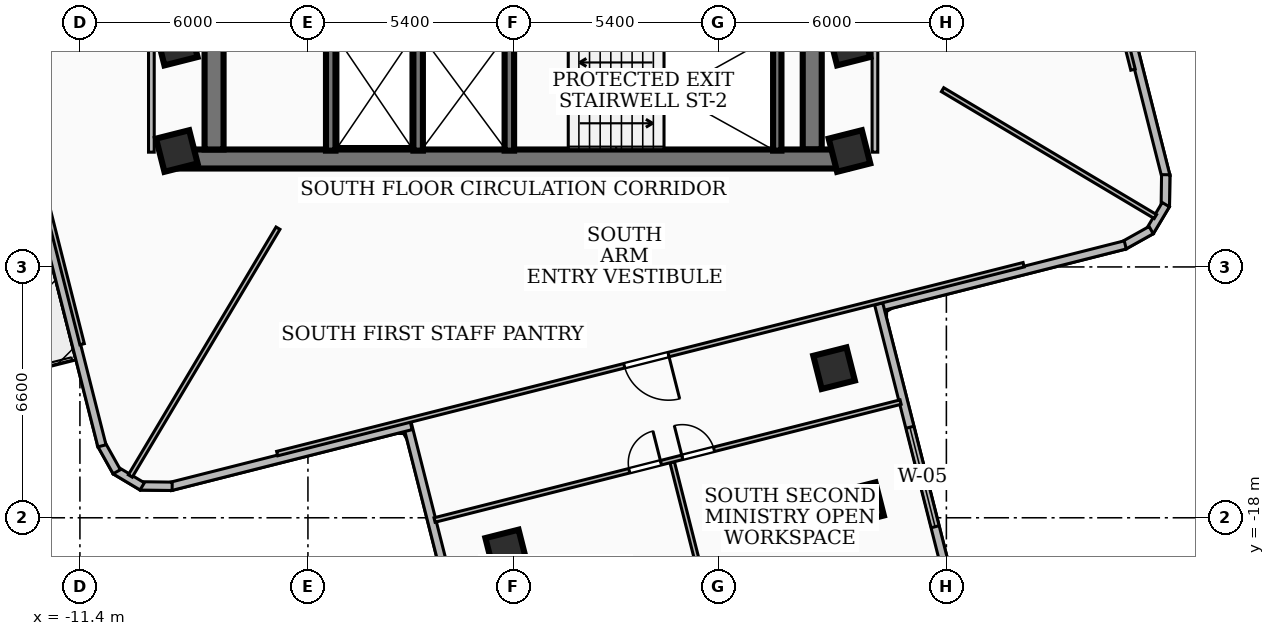
"""IFC4 building model, lengths in metres.
Left out: names, types, materials, properties, quantities, classifications, styles, units other than length and angle.
Written with IfcOpenShell. Run it as: python <this file> out.ifc"""

import sys

from ifc_helpers import new_model, si_unit, direction, frame, frame_2d, origin, origin_2d, place, context, subcontext, project, spatial, rectangle, extrude, element, fill, save


model = new_model("IFC4")
c1 = context("Model", 3, precision=1e-05, world=origin(), true_north=direction((0.0, 1.0)))
c2 = subcontext(c1, "Body", "Model", "MODEL_VIEW")
j1 = project(units=[si_unit("LENGTHUNIT", "METRE"), si_unit("PLANEANGLEUNIT", "RADIAN")], contexts=[c1])
p1 = place(None, origin())
s1 = spatial("IfcSite", under=j1, at=p1, CompositionType="ELEMENT")
p2 = place(p1, origin())
s2 = spatial("IfcBuilding", under=s1, at=p2, CompositionType="ELEMENT")
p3 = place(p2, frame((0.0, 0.0, 127.08)))
s3 = spatial("IfcBuildingStorey", under=s2, at=p3, CompositionType="ELEMENT", Elevation=127.08)
p4 = place(p3, frame((8.78, -8.56, 0.0), z_axis=(0.0, 0.0, 1.0), x_axis=(-1.0, 0.0, 0.0)))
e1 = element("IfcWall", 1, at=p4, inside=s3, PredefinedType="SHEAR", context=c2, shape_type="SweptSolid", body=[
    extrude(rectangle(XDim=17.56, YDim=0.5, at=frame_2d((8.78, 0.0))), origin(), (0.0, 0.0, 1.0), 3.34),
])
for number, where, z_axis, x_axis in (
    (2, (-7.87, -8.31, 0.0), (0.0, 0.0, 1.0), (0.0, 1.0, 0.0)),
    (3, (7.87, -2.0, 0.0), (0.0, 0.0, 1.0), (0.0, -1.0, 0.0)),
):
    element("IfcWall", number, at=place(p3, frame(where, z_axis=z_axis, x_axis=x_axis)), inside=s3, PredefinedType="SHEAR", context=c2, shape_type="SweptSolid", body=[
        extrude(rectangle(XDim=6.31, YDim=0.5, at=frame_2d((3.155, 0.0))), origin(), (0.0, 0.0, 1.0), 3.34),
    ])
p5 = place(p3, frame((6.95, -8.34, 0.0), z_axis=(0.0, 0.0, 1.0), x_axis=(0.0, 1.0, 0.0)))
e4 = element("IfcWall", 4, at=p5, inside=s3, PredefinedType="SOLIDWALL", context=c2, shape_type="SweptSolid", body=[
    extrude(rectangle(XDim=3.06, YDim=0.22, at=frame_2d((1.53, 0.0))), origin(), (0.0, 0.0, 1.0), 3.34),
])
for number, where, z_axis, x_axis in (
    (5, (-0.1, -8.34, 0.0), (0.0, 0.0, 1.0), (0.0, 1.0, 0.0)),
    (6, (-2.5, -8.34, 0.0), (0.0, 0.0, 1.0), (0.0, 1.0, 0.0)),
    (7, (-4.8, -8.34, 0.0), (0.0, 0.0, 1.0), (0.0, 1.0, 0.0)),
):
    element("IfcWall", number, at=place(p3, frame(where, z_axis=z_axis, x_axis=x_axis)), inside=s3, PredefinedType="SOLIDWALL", context=c2, shape_type="SweptSolid", body=[
        extrude(rectangle(XDim=3.04, YDim=0.25, at=frame_2d((1.52, 0.0))), origin(), (0.0, 0.0, 1.0), 3.34),
    ])
for number, where, z_axis, x_axis in (
    (8, (-8.85, -5.55, 0.0), (0.0, 0.0, 1.0), (0.969, 0.245, 0.0)),
    (9, (8.85, -5.55, 0.0), (0.0, 0.0, 1.0), (0.969, 0.245, 0.0)),
    (10, (8.85, -8.35, 0.0), (0.0, 0.0, 1.0), (0.969, 0.245, 0.0)),
    (11, (-8.85, -8.35, 0.0), (0.0, 0.0, 1.0), (0.969, 0.245, 0.0)),
    (12, (-0.183, -18.86, 0.0), (0.0, 0.0, 1.0), (0.969, 0.245, 0.0)),
    (13, (8.445, -14.064, 0.0), (0.0, 0.0, 1.0), (0.969, 0.245, 0.0)),
    (14, (9.208, -17.615, 0.0), (0.0, 0.0, 1.0), (0.969, 0.245, 0.0)),
):
    element("IfcColumn", number, at=place(p3, frame(where, z_axis=z_axis, x_axis=x_axis)), inside=s3, PredefinedType="COLUMN", context=c2, shape_type="SweptSolid", body=[
        extrude(rectangle(XDim=0.9, YDim=0.9, at=origin_2d()), origin(), (0.0, 0.0, 1.0), 3.6),
    ])
p6 = place(p3, frame((15.574, -2.684, 0.0), z_axis=(0.0, 0.0, 1.0), x_axis=(0.245346347134, -0.969435490349, 0.0)))
e15 = element("IfcWall", 15, at=p6, inside=s3, PredefinedType="SOLIDWALL", context=c2, shape_type="SweptSolid", body=[
    extrude(rectangle(XDim=6.538, YDim=0.22, at=frame_2d((3.269, 0.0))), origin(), (0.0, 0.0, 1.0), 3.34),
])
p7 = place(p3, frame((17.172, -8.973, 0.0), z_axis=(0.0, 0.0, 1.0), x_axis=(-0.013464821393, -0.999909345183, 0.0)))
e16 = element("IfcWall", 16, at=p7, inside=s3, PredefinedType="SOLIDWALL", context=c2, shape_type="SweptSolid", body=[
    extrude(rectangle(XDim=0.834, YDim=0.22, at=frame_2d((0.417, 0.0))), origin(), (0.0, 0.0, 1.0), 3.34),
])
p8 = place(p3, frame((17.174, -9.761, 0.0), z_axis=(0.0, 0.0, 1.0), x_axis=(-0.512960801038, -0.858412031951, 0.0)))
e17 = element("IfcWall", 17, at=p8, inside=s3, PredefinedType="SOLIDWALL", context=c2, shape_type="SweptSolid", body=[
    extrude(rectangle(XDim=0.819, YDim=0.22, at=frame_2d((0.41, 0.0))), origin(), (0.0, 0.0, 1.0), 3.34),
])
p9 = place(p3, frame((16.789, -10.431, 0.0), z_axis=(0.0, 0.0, 1.0), x_axis=(-0.872870149311, -0.487952561671, 0.0)))
e18 = element("IfcWall", 18, at=p9, inside=s3, PredefinedType="SOLIDWALL", context=c2, shape_type="SweptSolid", body=[
    extrude(rectangle(XDim=0.834, YDim=0.22, at=frame_2d((0.417, 0.0))), origin(), (0.0, 0.0, 1.0), 3.34),
])
p10 = place(p3, frame((16.107, -10.82, 0.0), z_axis=(0.0, 0.0, 1.0), x_axis=(-0.969443674581, -0.245314006561, 0.0)))
e19 = element("IfcWall", 19, at=p10, inside=s3, PredefinedType="SOLIDWALL", context=c2, shape_type="SweptSolid", body=[
    extrude(rectangle(XDim=6.759, YDim=0.22, at=frame_2d((3.379, 0.0))), origin(), (0.0, 0.0, 1.0), 3.34),
])
p11 = place(p3, frame((9.618, -12.371, 0.0), z_axis=(0.0, 0.0, 1.0), x_axis=(0.245401293719, -0.969421582719, 0.0)))
e20 = element("IfcWall", 20, at=p11, inside=s3, PredefinedType="SOLIDWALL", context=c2, shape_type="SweptSolid", body=[
    extrude(rectangle(XDim=9.458, YDim=0.22, at=frame_2d((4.729, 0.0))), origin(), (0.0, 0.0, 1.0), 3.34),
])
p12 = place(p11, frame((3.35, 0.0, 0.85)))
e21 = element("IfcOpeningElement", 21, at=p12, cuts=e20, PredefinedType="OPENING", context=c2, shape_type="SweptSolid", body=[
    extrude(rectangle(XDim=2.7, YDim=1.85, at=frame_2d((1.35, 0.925))), frame((0.0, 0.12, 0.0), z_axis=(0.0, -1.0, 0.0), x_axis=(1.0, 0.0, 0.0)), (0.0, 0.0, 1.0), 0.24),
])
p13 = place(p3, frame((-0.47, -24.68, 0.0), z_axis=(0.0, 0.0, 1.0), x_axis=(-0.245401293719, 0.969421582719, 0.0)))
e22 = element("IfcWall", 22, at=p13, inside=s3, PredefinedType="SOLIDWALL", context=c2, shape_type="SweptSolid", body=[
    extrude(rectangle(XDim=9.458, YDim=0.22, at=frame_2d((4.729, 0.0))), origin(), (0.0, 0.0, 1.0), 2.57),
])
p14 = place(p3, frame((-2.684, -15.574, 0.0), z_axis=(0.0, 0.0, 1.0), x_axis=(-0.969435490349, -0.245346347134, 0.0)))
e23 = element("IfcWall", 23, at=p14, inside=s3, PredefinedType="SOLIDWALL", context=c2, shape_type="SweptSolid", body=[
    extrude(rectangle(XDim=6.538, YDim=0.22, at=frame_2d((3.269, 0.0))), origin(), (0.0, 0.0, 1.0), 2.57),
])
p15 = place(p3, frame((-8.973, -17.172, 0.0), z_axis=(0.0, 0.0, 1.0), x_axis=(-0.999909345183, 0.013464821393, 0.0)))
e24 = element("IfcWall", 24, at=p15, inside=s3, PredefinedType="SOLIDWALL", context=c2, shape_type="SweptSolid", body=[
    extrude(rectangle(XDim=0.834, YDim=0.22, at=frame_2d((0.417, 0.0))), origin(), (0.0, 0.0, 1.0), 3.34),
])
p16 = place(p3, frame((-9.761, -17.174, 0.0), z_axis=(0.0, 0.0, 1.0), x_axis=(-0.858412031951, 0.512960801038, 0.0)))
e25 = element("IfcWall", 25, at=p16, inside=s3, PredefinedType="SOLIDWALL", context=c2, shape_type="SweptSolid", body=[
    extrude(rectangle(XDim=0.819, YDim=0.22, at=frame_2d((0.41, 0.0))), origin(), (0.0, 0.0, 1.0), 3.34),
])
p17 = place(p3, frame((-10.431, -16.789, 0.0), z_axis=(0.0, 0.0, 1.0), x_axis=(-0.487952561671, 0.872870149311, 0.0)))
e26 = element("IfcWall", 26, at=p17, inside=s3, PredefinedType="SOLIDWALL", context=c2, shape_type="SweptSolid", body=[
    extrude(rectangle(XDim=0.834, YDim=0.22, at=frame_2d((0.417, 0.0))), origin(), (0.0, 0.0, 1.0), 3.34),
])
p18 = place(p3, frame((-10.82, -16.107, 0.0), z_axis=(0.0, 0.0, 1.0), x_axis=(-0.245314006561, 0.969443674581, 0.0)))
e27 = element("IfcWall", 27, at=p18, inside=s3, PredefinedType="SOLIDWALL", context=c2, shape_type="SweptSolid", body=[
    extrude(rectangle(XDim=6.759, YDim=0.22, at=frame_2d((3.379, 0.0))), origin(), (0.0, 0.0, 1.0), 2.644),
])
for number, where, z_axis, x_axis in (
    (28, (-9.52, -8.38, 0.0), (0.0, 0.0, 1.0), (0.0, 1.0, 0.0)),
    (29, (9.52, -8.38, 0.0), (0.0, 0.0, 1.0), (0.0, 1.0, 0.0)),
):
    element("IfcWall", number, at=place(p3, frame(where, z_axis=z_axis, x_axis=x_axis)), inside=s3, PredefinedType="PARTITIONING", context=c2, shape_type="SweptSolid", body=[
        extrude(rectangle(XDim=6.63, YDim=0.15, at=frame_2d((3.315, 0.0))), origin(), (0.0, 0.0, 1.0), 2.57),
    ])
p19 = place(p3, frame((-6.188, -10.38, 0.0), z_axis=(0.0, 0.0, 1.0), x_axis=(-0.511972353143, -0.859001926434, 0.0)))
e30 = element("IfcWall", 30, at=p19, inside=s3, PredefinedType="PARTITIONING", context=c2, shape_type="SweptSolid", body=[
    extrude(rectangle(XDim=7.59, YDim=0.12, at=frame_2d((3.795, 0.0))), origin(), (0.0, 0.0, 1.0), 2.57),
])
p20 = place(p3, frame((11.3, -6.736, 0.0), z_axis=(0.0, 0.0, 1.0), x_axis=(0.858979599017, -0.512009812868, 0.0)))
e31 = element("IfcWall", 31, at=p20, inside=s3, PredefinedType="PARTITIONING", context=c2, shape_type="SweptSolid", body=[
    extrude(rectangle(XDim=6.519, YDim=0.12, at=frame_2d((3.26, 0.0))), origin(), (0.0, 0.0, 1.0), 3.34),
])
p21 = place(p3, frame((11.342, 13.433, 0.0), z_axis=(0.0, 0.0, 1.0), x_axis=(0.24525085526, -0.969459652587, 0.0)))
e32 = element("IfcWall", 32, at=p21, inside=s3, PredefinedType="PARTITIONING", context=c2, shape_type="SweptSolid", body=[
    extrude(rectangle(XDim=20.261, YDim=0.12, at=frame_2d((10.13, 0.0))), origin(), (0.0, 0.0, 1.0), 2.57),
])
p22 = place(p21, frame((9.64, 0.0, 0.0)))
e33 = element("IfcOpeningElement", 33, at=p22, cuts=e32, PredefinedType="OPENING", context=c2, shape_type="SweptSolid", body=[
    extrude(rectangle(XDim=1.2, YDim=2.1, at=frame_2d((0.6, 1.05))), frame((0.0, 0.07, 0.0), z_axis=(0.0, -1.0, 0.0), x_axis=(1.0, 0.0, 0.0)), (0.0, 0.0, 1.0), 0.14),
])
p23 = place(p3, frame((-11.342, -13.433, 0.0), z_axis=(0.0, 0.0, 1.0), x_axis=(-0.24525085526, 0.969459652587, 0.0)))
e34 = element("IfcWall", 34, at=p23, inside=s3, PredefinedType="PARTITIONING", context=c2, shape_type="SweptSolid", body=[
    extrude(rectangle(XDim=20.261, YDim=0.12, at=frame_2d((10.13, 0.0))), origin(), (0.0, 0.0, 1.0), 2.57),
])
p24 = place(p23, frame((9.64, 0.0, 0.0)))
e35 = element("IfcOpeningElement", 35, at=p24, cuts=e34, PredefinedType="OPENING", context=c2, shape_type="SweptSolid", body=[
    extrude(rectangle(XDim=1.2, YDim=2.1, at=frame_2d((0.6, 1.05))), frame((0.0, 0.07, 0.0), z_axis=(0.0, -1.0, 0.0), x_axis=(1.0, 0.0, 0.0)), (0.0, 0.0, 1.0), 0.14),
])
p25 = place(p3, frame((13.433, -11.342, 0.0), z_axis=(0.0, 0.0, 1.0), x_axis=(-0.969459652587, -0.24525085526, 0.0)))
e36 = element("IfcWall", 36, at=p25, inside=s3, PredefinedType="PARTITIONING", context=c2, shape_type="SweptSolid", body=[
    extrude(rectangle(XDim=20.261, YDim=0.12, at=frame_2d((10.13, 0.0))), origin(), (0.0, 0.0, 1.0), 2.57),
])
p26 = place(p25, frame((9.64, 0.0, 0.0)))
e37 = element("IfcOpeningElement", 37, at=p26, cuts=e36, PredefinedType="OPENING", context=c2, shape_type="SweptSolid", body=[
    extrude(rectangle(XDim=1.2, YDim=2.1, at=frame_2d((0.6, 1.05))), frame((0.0, 0.07, 0.0), z_axis=(0.0, -1.0, 0.0), x_axis=(1.0, 0.0, 0.0)), (0.0, 0.0, 1.0), 0.14),
])
p27 = place(p3, frame((4.185, -16.539, 0.0), z_axis=(0.0, 0.0, 1.0), x_axis=(0.245296506438, -0.969448102752, 0.0)))
e38 = element("IfcWall", 38, at=p27, inside=s3, PredefinedType="PARTITIONING", context=c2, shape_type="SweptSolid", body=[
    extrude(rectangle(XDim=4.68, YDim=0.12, at=frame_2d((2.34, 0.0))), origin(), (0.0, 0.0, 1.0), 2.72),
])
p28 = place(p3, frame((-2.068, -18.059, 0.0), z_axis=(0.0, 0.0, 1.0), x_axis=(0.969446010802, 0.245304773986, 0.0)))
e39 = element("IfcWall", 39, at=p28, inside=s3, PredefinedType="PARTITIONING", context=c2, shape_type="SweptSolid", body=[
    extrude(rectangle(XDim=12.65, YDim=0.12, at=frame_2d((6.325, 0.0))), origin(), (0.0, 0.0, 1.0), 2.57),
])
p29 = place(p28, frame((5.285, 0.0, 0.0)))
e40 = element("IfcOpeningElement", 40, at=p29, cuts=e39, PredefinedType="OPENING", context=c2, shape_type="SweptSolid", body=[
    extrude(rectangle(XDim=0.86, YDim=2.04, at=frame_2d((0.43, 1.02))), frame((0.0, 0.07, 0.0), z_axis=(0.0, -1.0, 0.0), x_axis=(1.0, 0.0, 0.0)), (0.0, 0.0, 1.0), 0.14),
])
p30 = place(p28, frame((6.725, 0.0, 0.0)))
e41 = element("IfcOpeningElement", 41, at=p30, cuts=e39, PredefinedType="OPENING", context=c2, shape_type="SweptSolid", body=[
    extrude(rectangle(XDim=0.86, YDim=2.04, at=frame_2d((0.43, 1.02))), frame((0.0, 0.07, 0.0), z_axis=(0.0, -1.0, 0.0), x_axis=(1.0, 0.0, 0.0)), (0.0, 0.0, 1.0), 0.14),
])
p31 = place(p12, origin())
e42 = element("IfcWindow", 42, at=p31, inside=s3, PartitioningType="SINGLE_PANEL", PredefinedType="WINDOW", context=c2, shape_type="SweptSolid", body=[
    extrude(rectangle(XDim=2.7, YDim=1.85, at=frame_2d((1.35, 0.925))), frame((0.0, 0.03, 0.0), z_axis=(0.0, -1.0, 0.0), x_axis=(1.0, 0.0, 0.0)), (0.0, 0.0, 1.0), 0.06),
])
fill(e21, e42)
p32 = place(p26, origin())
e43 = element("IfcDoor", 43, at=p32, inside=s3, OperationType="SINGLE_SWING_LEFT", PredefinedType="DOOR", context=c2, shape_type="SweptSolid", body=[
    extrude(rectangle(XDim=1.2, YDim=2.1, at=frame_2d((0.6, 1.05))), frame((0.0, 0.025, 0.0), z_axis=(0.0, -1.0, 0.0), x_axis=(1.0, 0.0, 0.0)), (0.0, 0.0, 1.0), 0.05),
])
fill(e37, e43)
p33 = place(p29, origin())
e44 = element("IfcDoor", 44, at=p33, inside=s3, OperationType="SINGLE_SWING_RIGHT", PredefinedType="DOOR", context=c2, shape_type="SweptSolid", body=[
    extrude(rectangle(XDim=0.86, YDim=2.04, at=frame_2d((0.43, 1.02))), frame((0.0, 0.025, 0.0), z_axis=(0.0, -1.0, 0.0), x_axis=(1.0, 0.0, 0.0)), (0.0, 0.0, 1.0), 0.05),
])
fill(e40, e44)
p34 = place(p30, origin())
e45 = element("IfcDoor", 45, at=p34, inside=s3, OperationType="SINGLE_SWING_LEFT", PredefinedType="DOOR", context=c2, shape_type="SweptSolid", body=[
    extrude(rectangle(XDim=0.86, YDim=2.04, at=frame_2d((0.43, 1.02))), frame((0.0, 0.025, 0.0), z_axis=(0.0, -1.0, 0.0), x_axis=(1.0, 0.0, 0.0)), (0.0, 0.0, 1.0), 0.05),
])
fill(e41, e45)
save(model, sys.argv[1])
